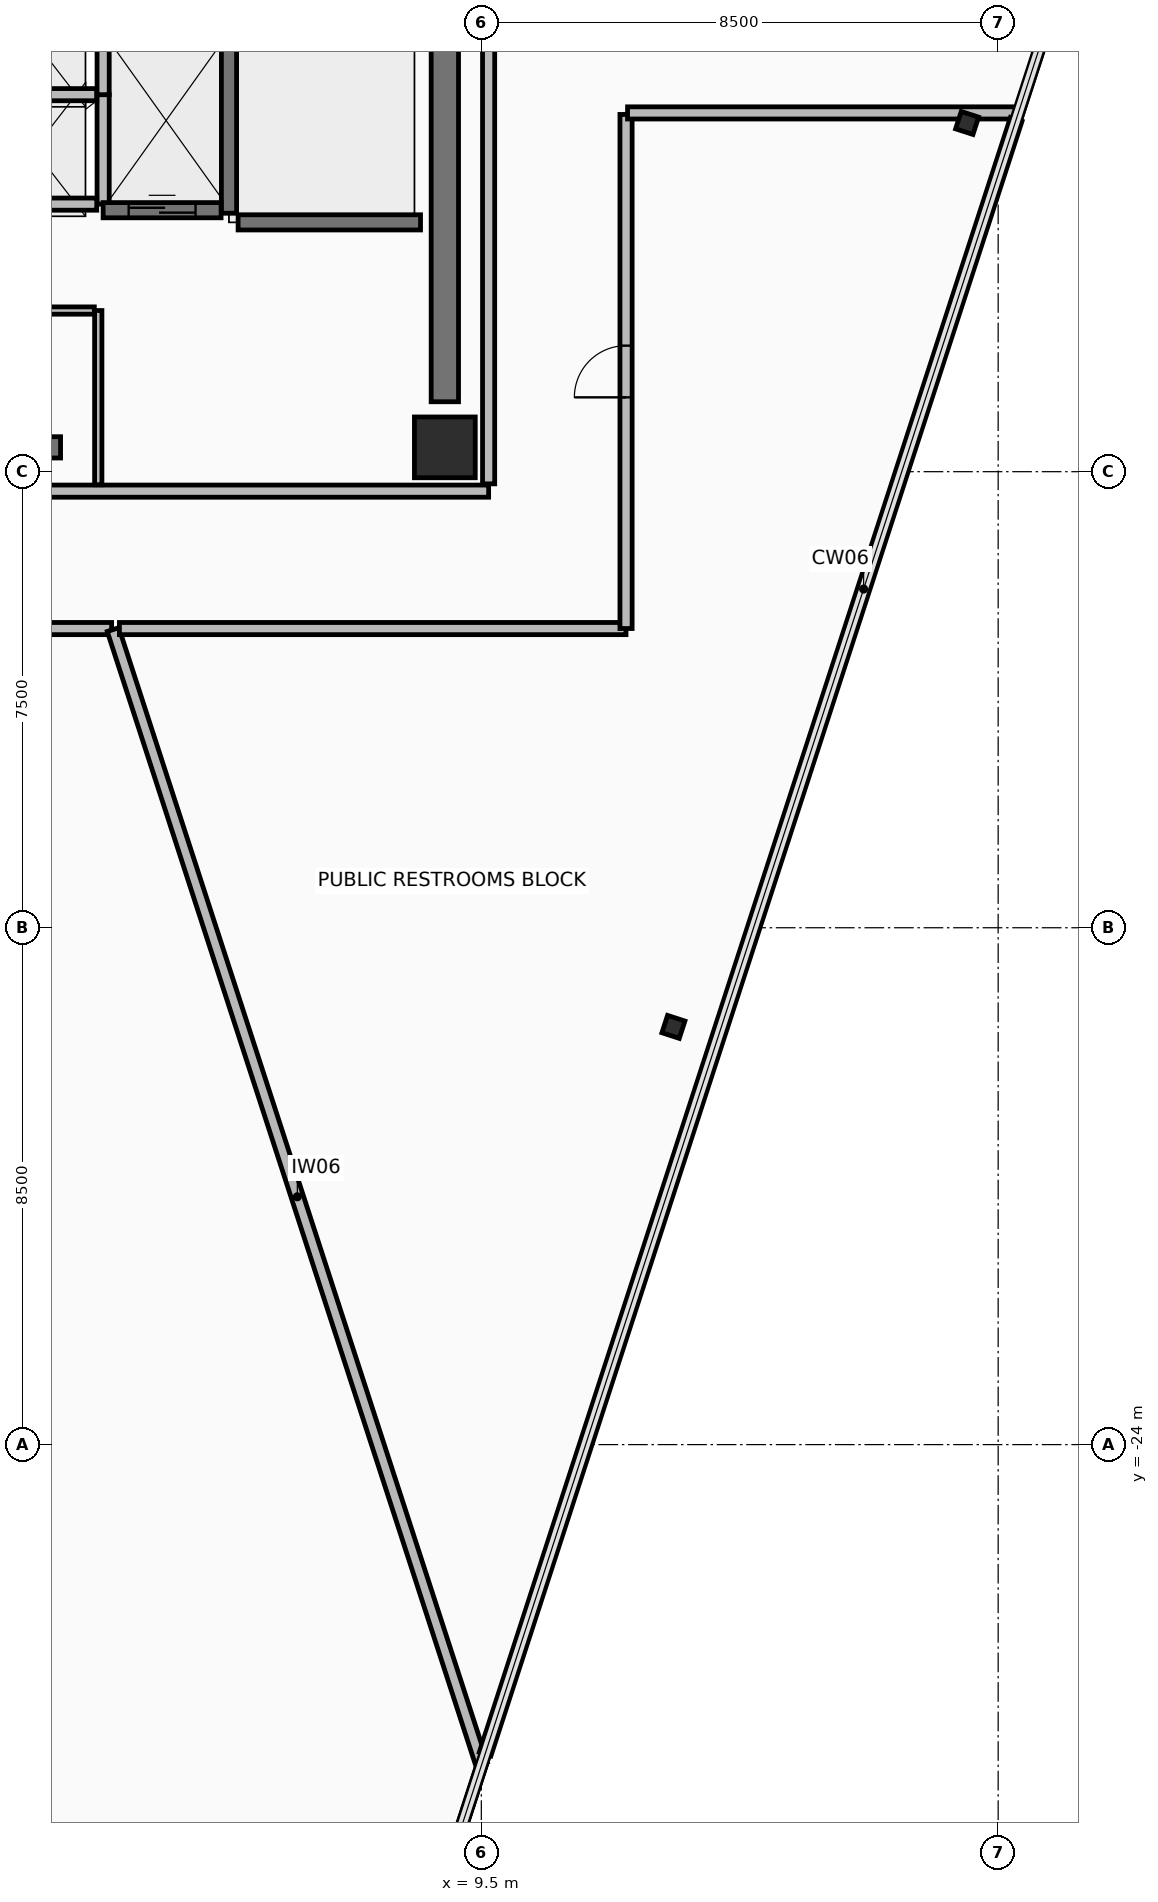
"""IFC4 building model, lengths in metres.
Left out: names, types, materials, properties, quantities, classifications, styles, units other than length and angle.
Written with IfcOpenShell. Run it as: python <this file> out.ifc"""

import sys

from ifc_helpers import new_model, si_unit, direction, frame, frame_2d, origin, origin_2d, place, context, subcontext, project, spatial, rectangle, hollow_rectangle, extrude, element, fill, save


model = new_model("IFC4")
c1 = context("Model", 3, precision=1e-05, world=origin(), true_north=direction((0.0, 1.0)))
c2 = subcontext(c1, "Body", "Model", "MODEL_VIEW")
j1 = project(units=[si_unit("LENGTHUNIT", "METRE"), si_unit("PLANEANGLEUNIT", "RADIAN")], contexts=[c1])
p1 = place(None, origin())
s1 = spatial("IfcSite", under=j1, at=p1, CompositionType="ELEMENT")
p2 = place(p1, origin())
s2 = spatial("IfcBuilding", under=s1, at=p2, CompositionType="ELEMENT")
p3 = place(p2, frame((0.0, 0.0, 302.15)))
s3 = spatial("IfcBuildingStorey", under=s2, at=p3, CompositionType="ELEMENT", Elevation=302.15)
p4 = place(p3, frame((8.9, -7.6, 0.0), z_axis=(0.0, 0.0, 1.0), x_axis=(1.0, 0.0, 0.0)))
e1 = element("IfcColumn", 1, at=p4, inside=s3, PredefinedType="COLUMN", context=c2, shape_type="SweptSolid", body=[
    extrude(rectangle(XDim=1.0, YDim=1.0, at=origin_2d()), origin(), (0.0, 0.0, 1.0), 4.15),
])
for number, where, z_axis, x_axis in (
    (2, (12.659, -17.131, 0.0), (0.0, 0.0, 1.0), (0.309, 0.951, 0.0)),
    (3, (17.489, -2.265, 0.0), (0.0, 0.0, 1.0), (0.309, 0.951, 0.0)),
):
    element("IfcColumn", number, at=place(p3, frame(where, z_axis=z_axis, x_axis=x_axis)), inside=s3, PredefinedType="COLUMN", context=c2, shape_type="SweptSolid", body=[
        extrude(hollow_rectangle(XDim=0.3, YDim=0.3, WallThickness=0.02, at=origin_2d()), origin(), (0.0, 0.0, 1.0), 4.15),
    ])
p5 = place(p3, frame((-2.8, -7.6, 0.0), z_axis=(0.0, 0.0, 1.0), x_axis=(1.0, 0.0, 0.0)))
e4 = element("IfcWall", 4, at=p5, inside=s3, PredefinedType="SHEAR", context=c2, shape_type="SweptSolid", body=[
    extrude(rectangle(XDim=5.38, YDim=0.35, at=frame_2d((2.69, 0.0))), origin(), (0.0, 0.0, 1.0), 3.95),
])
p6 = place(p3, frame((8.9, -6.85, 0.0), z_axis=(0.0, 0.0, 1.0), x_axis=(0.0, 1.0, 0.0)))
e5 = element("IfcWall", 5, at=p6, inside=s3, PredefinedType="SHEAR", context=c2, shape_type="SweptSolid", body=[
    extrude(rectangle(XDim=10.7, YDim=0.45, at=frame_2d((5.35, 0.0))), origin(), (0.0, 0.0, 1.0), 3.95),
])
p7 = place(p3, frame((-9.62, -8.32, 0.0), z_axis=(0.0, 0.0, 1.0), x_axis=(1.0, 0.0, 0.0)))
e6 = element("IfcWall", 6, at=p7, inside=s3, PredefinedType="PARTITIONING", context=c2, shape_type="SweptSolid", body=[
    extrude(rectangle(XDim=19.24, YDim=0.2, at=frame_2d((9.62, 0.0))), origin(), (0.0, 0.0, 1.0), 3.445),
])
p8 = place(p7, frame((7.37, 0.0, 0.0)))
e7 = element("IfcOpeningElement", 7, at=p8, cuts=e6, PredefinedType="OPENING", context=c2, shape_type="SweptSolid", body=[
    extrude(rectangle(XDim=0.9, YDim=2.1, at=frame_2d((0.45, 1.05))), frame((0.0, 0.11, 0.0), z_axis=(0.0, -1.0, 0.0), x_axis=(1.0, 0.0, 0.0)), (0.0, 0.0, 1.0), 0.22),
])
p9 = place(p7, frame((10.77, 0.0, 0.0)))
e8 = element("IfcOpeningElement", 8, at=p9, cuts=e6, PredefinedType="OPENING", context=c2, shape_type="SweptSolid", body=[
    extrude(rectangle(XDim=0.9, YDim=2.1, at=frame_2d((0.45, 1.05))), frame((0.0, 0.11, 0.0), z_axis=(0.0, -1.0, 0.0), x_axis=(1.0, 0.0, 0.0)), (0.0, 0.0, 1.0), 0.22),
])
p10 = place(p3, frame((9.62, -8.2, 0.0), z_axis=(0.0, 0.0, 1.0), x_axis=(0.0, 1.0, 0.0)))
e9 = element("IfcWall", 9, at=p10, inside=s3, PredefinedType="PARTITIONING", context=c2, shape_type="SweptSolid", body=[
    extrude(rectangle(XDim=16.4, YDim=0.2, at=frame_2d((8.2, 0.0))), origin(), (0.0, 0.0, 1.0), 3.445),
])
p11 = place(p10, frame((12.65, 0.0, 0.0)))
e10 = element("IfcOpeningElement", 10, at=p11, cuts=e9, PredefinedType="OPENING", context=c2, shape_type="SweptSolid", body=[
    extrude(rectangle(XDim=1.1, YDim=2.15, at=frame_2d((0.55, 1.075))), frame((0.0, 0.11, 0.0), z_axis=(0.0, -1.0, 0.0), x_axis=(1.0, 0.0, 0.0)), (0.0, 0.0, 1.0), 0.22),
])
p12 = place(p3, frame((5.35, -3.75, 0.0), z_axis=(0.0, 0.0, 1.0), x_axis=(0.0, 1.0, 0.0)))
e11 = element("IfcWall", 11, at=p12, inside=s3, PredefinedType="SHEAR", context=c2, shape_type="SweptSolid", body=[
    extrude(rectangle(XDim=7.3, YDim=0.25, at=frame_2d((3.65, 0.0))), origin(), (0.0, 0.0, 1.0), 3.95),
])
p13 = place(p3, frame((5.5, -3.9, 0.0), z_axis=(0.0, 0.0, 1.0), x_axis=(1.0, 0.0, 0.0)))
e12 = element("IfcWall", 12, at=p13, inside=s3, PredefinedType="SHEAR", context=c2, shape_type="SweptSolid", body=[
    extrude(rectangle(XDim=3.0, YDim=0.25, at=frame_2d((1.5, 0.0))), origin(), (0.0, 0.0, 1.0), 3.95),
])
p14 = place(p3, frame((3.28, -3.6, 0.0), z_axis=(0.0, 0.0, 1.0), x_axis=(0.0, 1.0, 0.0)))
e13 = element("IfcWall", 13, at=p14, inside=s3, PredefinedType="PARTITIONING", context=c2, shape_type="SweptSolid", body=[
    extrude(rectangle(XDim=1.8, YDim=0.2, at=frame_2d((0.9, 0.0))), origin(), (0.0, 0.0, 1.0), 3.95),
])
for number, where, z_axis, x_axis in (
    (14, (1.13, -3.6, 0.0), (0.0, 0.0, 1.0), (1.0, 0.0, 0.0)),
    (15, (1.13, -1.8, 0.0), (0.0, 0.0, 1.0), (1.0, 0.0, 0.0)),
):
    element("IfcWall", number, at=place(p3, frame(where, z_axis=z_axis, x_axis=x_axis)), inside=s3, PredefinedType="PARTITIONING", context=c2, shape_type="SweptSolid", body=[
        extrude(rectangle(XDim=2.045, YDim=0.2, at=frame_2d((1.022, 0.0))), origin(), (0.0, 0.0, 1.0), 3.95),
    ])
p15 = place(p3, frame((3.28, -1.8, 0.0), z_axis=(0.0, 0.0, 1.0), x_axis=(0.0, 1.0, 0.0)))
e16 = element("IfcWall", 16, at=p15, inside=s3, PredefinedType="PARTITIONING", context=c2, shape_type="SweptSolid", body=[
    extrude(rectangle(XDim=1.8, YDim=0.2, at=frame_2d((0.9, 0.0))), origin(), (0.0, 0.0, 1.0), 3.95),
])
p16 = place(p3, frame((3.28, -3.7, 0.0), z_axis=(0.0, 0.0, 1.0), x_axis=(1.0, 0.0, 0.0)))
e17 = element("IfcWall", 17, at=p16, inside=s3, PredefinedType="SHEAR", context=c2, shape_type="SweptSolid", body=[
    extrude(rectangle(XDim=1.94, YDim=0.25, at=frame_2d((0.97, 0.0))), origin(), (0.0, 0.0, 1.0), 3.95),
])
p17 = place(p16, frame((0.42, 0.0, 0.0)))
e18 = element("IfcOpeningElement", 18, at=p17, cuts=e17, PredefinedType="OPENING", context=c2, shape_type="SweptSolid", body=[
    extrude(rectangle(XDim=1.1, YDim=2.2, at=frame_2d((0.55, 1.1))), frame((0.0, 0.135, 0.0), z_axis=(0.0, -1.0, 0.0), x_axis=(1.0, 0.0, 0.0)), (0.0, 0.0, 1.0), 0.27),
])
p18 = place(p3, frame((3.2, -8.215, 0.0), z_axis=(0.0, 0.0, 1.0), x_axis=(0.0, 1.0, 0.0)))
e19 = element("IfcWall", 19, at=p18, inside=s3, PredefinedType="PARTITIONING", context=c2, shape_type="SweptSolid", body=[
    extrude(rectangle(XDim=2.865, YDim=0.12, at=frame_2d((1.433, 0.0))), origin(), (0.0, 0.0, 1.0), 3.245),
])
p19 = place(p3, frame((3.135, -5.35, 0.0), z_axis=(0.0, 0.0, 1.0), x_axis=(-1.0, 0.0, 0.0)))
e20 = element("IfcWall", 20, at=p19, inside=s3, PredefinedType="PARTITIONING", context=c2, shape_type="SweptSolid", body=[
    extrude(rectangle(XDim=3.135, YDim=0.12, at=frame_2d((1.567, 0.0))), origin(), (0.0, 0.0, 1.0), 3.95),
])
p20 = place(p3, frame((-11.879, -10.58, 0.0), z_axis=(0.0, 0.0, 1.0), x_axis=(1.0, 0.0, 0.0)))
e21 = element("IfcWall", 21, at=p20, inside=s3, PredefinedType="PARTITIONING", context=c2, shape_type="SweptSolid", body=[
    extrude(rectangle(XDim=15.299, YDim=0.2, at=frame_2d((7.649, 0.0))), origin(), (0.0, 0.0, 1.0), 3.445),
])
p21 = place(p20, frame((7.224, 0.0, 0.0)))
e22 = element("IfcOpeningElement", 22, at=p21, cuts=e21, PredefinedType="OPENING", context=c2, shape_type="SweptSolid", body=[
    extrude(rectangle(XDim=0.85, YDim=2.1, at=frame_2d((0.425, 1.05))), frame((0.0, 0.11, 0.0), z_axis=(0.0, -1.0, 0.0), x_axis=(1.0, 0.0, 0.0)), (0.0, 0.0, 1.0), 0.22),
])
p22 = place(p3, frame((3.443, -10.597, 0.0), z_axis=(0.0, 0.0, 1.0), x_axis=(0.309011768736, -0.951058214192, 0.0)))
e23 = element("IfcWall", 23, at=p22, inside=s3, PredefinedType="PARTITIONING", context=c2, shape_type="SweptSolid", body=[
    extrude(rectangle(XDim=19.614, YDim=0.2, at=frame_2d((9.807, 0.0))), origin(), (0.0, 0.0, 1.0), 3.295),
])
p23 = place(p3, frame((9.504, -29.267, 0.0), z_axis=(0.0, 0.0, 1.0), x_axis=(-0.30900259688, -0.951061194204, 0.0)))
e24 = element("IfcWall", 24, at=p23, inside=s3, PredefinedType="PARTITIONING", context=c2, shape_type="SweptSolid", body=[
    extrude(rectangle(XDim=4.232, YDim=0.15, at=frame_2d((2.116, 0.0))), origin(), (0.0, 0.0, 1.0), 3.95),
])
p24 = place(p3, frame((4.101, -34.163, 0.0), z_axis=(0.0, 0.0, 1.0), x_axis=(-0.669132723426, 0.743142919256, 0.0)))
e25 = element("IfcWall", 25, at=p24, inside=s3, PredefinedType="PARTITIONING", context=c2, shape_type="SweptSolid", body=[
    extrude(rectangle(XDim=30.187, YDim=0.15, at=frame_2d((15.093, 0.0))), origin(), (0.0, 0.0, 1.0), 3.95),
])
p25 = place(p3, frame((3.548, -10.58, 0.0), z_axis=(0.0, 0.0, 1.0), x_axis=(1.0, 0.0, 0.0)))
e26 = element("IfcWall", 26, at=p25, inside=s3, PredefinedType="PARTITIONING", context=c2, shape_type="SweptSolid", body=[
    extrude(rectangle(XDim=8.331, YDim=0.2, at=frame_2d((4.166, 0.0))), origin(), (0.0, 0.0, 1.0), 3.445),
])
p26 = place(p3, frame((11.88, -10.579, 0.0), z_axis=(0.0, 0.0, 1.0), x_axis=(0.0, 1.0, 0.0)))
e27 = element("IfcWall", 27, at=p26, inside=s3, PredefinedType="PARTITIONING", context=c2, shape_type="SweptSolid", body=[
    extrude(rectangle(XDim=8.454, YDim=0.2, at=frame_2d((4.227, 0.0))), origin(), (0.0, 0.0, 1.0), 3.445),
])
p27 = place(p26, frame((3.802, 0.0, 0.0)))
e28 = element("IfcOpeningElement", 28, at=p27, cuts=e27, PredefinedType="OPENING", context=c2, shape_type="SweptSolid", body=[
    extrude(rectangle(XDim=0.85, YDim=2.1, at=frame_2d((0.425, 1.05))), frame((0.0, 0.11, 0.0), z_axis=(0.0, -1.0, 0.0), x_axis=(1.0, 0.0, 0.0)), (0.0, 0.0, 1.0), 0.22),
])
p28 = place(p3, frame((11.905, -2.1, 0.0), z_axis=(0.0, 0.0, 1.0), x_axis=(1.0, 0.0, 0.0)))
e29 = element("IfcWall", 29, at=p28, inside=s3, PredefinedType="PARTITIONING", context=c2, shape_type="SweptSolid", body=[
    extrude(rectangle(XDim=6.427, YDim=0.2, at=frame_2d((3.213, 0.0))), origin(), (0.0, 0.0, 1.0), 3.295),
])
p29 = place(p3, frame((18.298, -2.205, 0.0), z_axis=(0.0, 0.0, 1.0), x_axis=(-0.309026118402, -0.951053551671, 0.0)))
e30 = element("IfcWall", 30, at=p29, inside=s3, PredefinedType="PARTITIONING", context=c2, shape_type="SweptSolid", body=[
    extrude(rectangle(XDim=28.268, YDim=0.2, at=frame_2d((14.134, 0.0))), origin(), (0.0, 0.0, 1.0), 3.95),
])
p30 = place(p17, origin())
e31 = element("IfcDoor", 31, at=p30, inside=s3, OperationType="SLIDING_TO_LEFT", PredefinedType="DOOR", context=c2, shape_type="SweptSolid", body=[
    extrude(rectangle(XDim=1.1, YDim=2.2, at=frame_2d((0.55, 1.1))), frame((0.0, 0.025, 0.0), z_axis=(0.0, -1.0, 0.0), x_axis=(1.0, 0.0, 0.0)), (0.0, 0.0, 1.0), 0.05),
])
fill(e18, e31)
p31 = place(p27, origin())
e32 = element("IfcDoor", 32, at=p31, inside=s3, OperationType="SINGLE_SWING_RIGHT", PredefinedType="DOOR", context=c2, shape_type="SweptSolid", body=[
    extrude(rectangle(XDim=0.85, YDim=2.1, at=frame_2d((0.425, 1.05))), frame((0.0, 0.025, 0.0), z_axis=(0.0, -1.0, 0.0), x_axis=(1.0, 0.0, 0.0)), (0.0, 0.0, 1.0), 0.05),
])
fill(e28, e32)
save(model, sys.argv[1])
